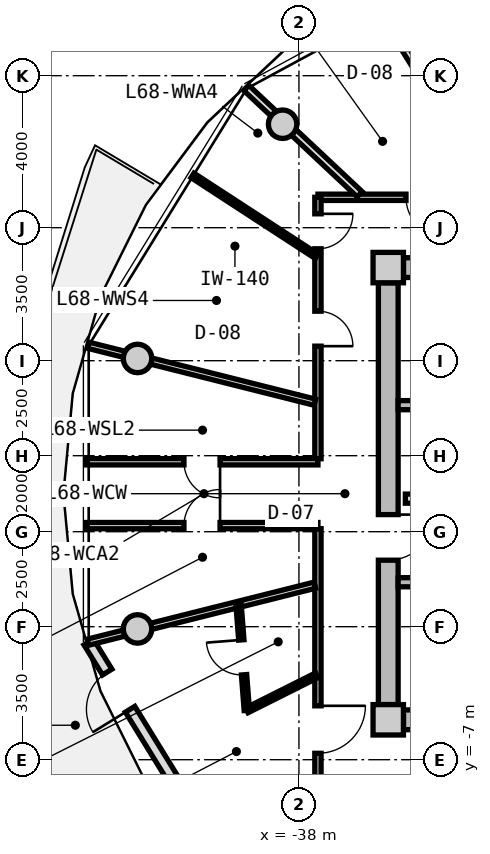
"""IFC4 building model, lengths in metres.
Left out: names, types, materials, properties, quantities, classifications, styles, units other than length and angle.
Written with IfcOpenShell. Run it as: python <this file> out.ifc"""

import sys

from ifc_helpers import new_model, si_unit, direction, frame, frame_2d, origin, origin_2d, place, context, subcontext, project, spatial, rectangle, circle, extrude, source, transform, mapped, element, fill, save


model = new_model("IFC4")
c1 = context("Model", 3, precision=1e-05, world=origin(), true_north=direction((0.0, 1.0)))
c2 = subcontext(c1, "Body", "Model", "MODEL_VIEW")
j1 = project(units=[si_unit("LENGTHUNIT", "METRE"), si_unit("PLANEANGLEUNIT", "RADIAN")], contexts=[c1])
p1 = place(None, origin())
s1 = spatial("IfcSite", under=j1, at=p1, CompositionType="ELEMENT")
p2 = place(p1, origin())
s2 = spatial("IfcBuilding", under=s1, at=p2, CompositionType="ELEMENT")
p3 = place(p2, frame((0.0, 0.0, 220.0)))
s3 = spatial("IfcBuildingStorey", under=s2, at=p3, CompositionType="ELEMENT", Elevation=220.0)
m1 = source(origin(), c2, "Body", "SweptSolid", [
    extrude(rectangle(XDim=0.8, YDim=0.8, at=origin_2d()), origin(), (0.0, 0.0, 1.0), 3.05),
])
for number, where, z_axis, x_axis in (
    (1, (-35.65, -5.95, 0.0), (0.0, 0.0, 1.0), (1.0, 0.0, 0.0)),
    (2, (-35.65, 5.95, 0.0), (0.0, 0.0, 1.0), (1.0, 0.0, 0.0)),
):
    element("IfcColumn", number, at=place(p3, frame(where, z_axis=z_axis, x_axis=x_axis)), inside=s3, PredefinedType="COLUMN", context=c2, shape_type="MappedRepresentation", body=[
        mapped(m1, transform((0.0, 0.0, 0.0), x_axis=(1.0, 0.0, 0.0), y_axis=(0.0, 1.0, 0.0), z_axis=(0.0, 0.0, 1.0), scale=1.0)),
    ])
m2 = source(origin(), c2, "Body", "SweptSolid", [
    extrude(rectangle(XDim=14.5, YDim=0.52, at=frame_2d((7.25, 0.0))), origin(), (0.0, 0.0, 1.0), 2.76),
])
for number, where, z_axis, x_axis in (
    (3, (-35.25, 5.95, 0.0), (0.0, 0.0, 1.0), (1.0, 0.0, 0.0)),
    (4, (-20.75, -5.95, 0.0), (0.0, 0.0, 1.0), (-1.0, 0.0, 0.0)),
):
    element("IfcWall", number, at=place(p3, frame(where, z_axis=z_axis, x_axis=x_axis)), inside=s3, PredefinedType="SHEAR", context=c2, shape_type="MappedRepresentation", body=[
        mapped(m2, transform((0.0, 0.0, 0.0), x_axis=(1.0, 0.0, 0.0), y_axis=(0.0, 1.0, 0.0), z_axis=(0.0, 0.0, 1.0), scale=1.0)),
    ])
m3 = source(origin(), c2, "Body", "SweptSolid", [
    extrude(rectangle(XDim=11.1, YDim=0.52, at=frame_2d((5.55, 0.0))), origin(), (0.0, 0.0, 1.0), 2.76),
])
p4 = place(p3, frame((-35.65, -5.55, 0.0), z_axis=(0.0, 0.0, 1.0), x_axis=(0.0, 1.0, 0.0)))
e5 = element("IfcWall", 5, at=p4, inside=s3, PredefinedType="SHEAR", context=c2, shape_type="MappedRepresentation", body=[
    mapped(m3, transform((0.0, 0.0, 0.0), x_axis=(1.0, 0.0, 0.0), y_axis=(0.0, 1.0, 0.0), z_axis=(0.0, 0.0, 1.0), scale=1.0)),
])
p5 = place(p4, frame((3.8, 0.0, 0.0)))
e6 = element("IfcOpeningElement", 6, at=p5, cuts=e5, PredefinedType="OPENING", context=c2, shape_type="SweptSolid", body=[
    extrude(rectangle(XDim=1.2, YDim=2.15, at=frame_2d((0.6, 1.075))), frame((0.0, 0.27, 0.0), z_axis=(0.0, -1.0, 0.0), x_axis=(1.0, 0.0, 0.0)), (0.0, 0.0, 1.0), 0.54),
])
m4 = source(origin(), c2, "Body", "SweptSolid", [
    extrude(circle(Radius=0.375, at=origin_2d()), origin(), (0.0, 0.0, 1.0), 3.05),
])
for number, where, z_axis, x_axis in (
    (7, (-38.43, 9.723, 0.0), (0.0, 0.0, 1.0), (1.0, 0.0, 0.0)),
    (8, (-42.247, 3.559, 0.0), (0.0, 0.0, 1.0), (1.0, 0.0, 0.0)),
    (9, (-42.247, -3.559, 0.0), (0.0, 0.0, 1.0), (1.0, 0.0, 0.0)),
):
    element("IfcColumn", number, at=place(p3, frame(where, z_axis=z_axis, x_axis=x_axis)), inside=s3, PredefinedType="COLUMN", context=c2, shape_type="MappedRepresentation", body=[
        mapped(m4, transform((0.0, 0.0, 0.0), x_axis=(1.0, 0.0, 0.0), y_axis=(0.0, 1.0, 0.0), z_axis=(0.0, 0.0, 1.0), scale=1.0)),
    ])
m5 = source(origin(), c2, "Body", "SweptSolid", [
    extrude(rectangle(XDim=7.938, YDim=0.29, at=frame_2d((3.969, 0.0))), origin(), (0.0, 0.0, 1.0), 2.76),
])
p6 = place(p3, frame((-39.37, -10.663, 0.0), z_axis=(0.0, 0.0, 1.0), x_axis=(-0.524244987663, 0.851567491694, 0.0)))
e10 = element("IfcWall", 10, at=p6, inside=s3, PredefinedType="SOLIDWALL", context=c2, shape_type="MappedRepresentation", body=[
    mapped(m5, transform((0.0, 0.0, 0.0), x_axis=(1.0, 0.0, 0.0), y_axis=(0.0, 1.0, 0.0), z_axis=(0.0, 0.0, 1.0), scale=1.0)),
])
p7 = place(p6, frame((5.86, 0.0, 0.0)))
e11 = element("IfcOpeningElement", 11, at=p7, cuts=e10, PredefinedType="OPENING", context=c2, shape_type="SweptSolid", body=[
    extrude(rectangle(XDim=1.15, YDim=2.25, at=frame_2d((0.575, 1.125))), frame((0.0, 0.155, 0.0), z_axis=(0.0, -1.0, 0.0), x_axis=(1.0, 0.0, 0.0)), (0.0, 0.0, 1.0), 0.31),
])
p8 = place(p6, frame((0.85, 0.0, 0.85)))
e12 = element("IfcOpeningElement", 12, at=p8, cuts=e10, PredefinedType="OPENING", context=c2, shape_type="SweptSolid", body=[
    extrude(rectangle(XDim=1.2, YDim=1.5, at=frame_2d((0.6, 0.75))), frame((0.0, 0.155, 0.0), z_axis=(0.0, -1.0, 0.0), x_axis=(1.0, 0.0, 0.0)), (0.0, 0.0, 1.0), 0.31),
])
m6 = source(origin(), c2, "Body", "SweptSolid", [
    extrude(rectangle(XDim=7.93, YDim=0.24, at=frame_2d((3.965, 0.0))), origin(), (0.0, 0.0, 1.0), 2.76),
])
p9 = place(p3, frame((-35.39, 2.33, 0.0), z_axis=(0.0, 0.0, 1.0), x_axis=(1.0, 0.0, 0.0)))
e13 = element("IfcWall", 13, at=p9, inside=s3, PredefinedType="PARTITIONING", context=c2, shape_type="MappedRepresentation", body=[
    mapped(m6, transform((0.0, 0.0, 0.0), x_axis=(1.0, 0.0, 0.0), y_axis=(0.0, 1.0, 0.0), z_axis=(0.0, 0.0, 1.0), scale=1.0)),
])
p10 = place(p3, frame((-35.39, -2.33, 0.0), z_axis=(0.0, 0.0, 1.0), x_axis=(1.0, 0.0, 0.0)))
e14 = element("IfcWall", 14, at=p10, inside=s3, PredefinedType="PARTITIONING", context=c2, shape_type="MappedRepresentation", body=[
    mapped(m6, transform((0.0, 0.0, 0.0), x_axis=(1.0, 0.0, 0.0), y_axis=(0.0, 1.0, 0.0), z_axis=(0.0, 0.0, 1.0), scale=1.0)),
])
p11 = place(p10, frame((1.05, 0.0, 0.0)))
e15 = element("IfcOpeningElement", 15, at=p11, cuts=e14, PredefinedType="OPENING", context=c2, shape_type="SweptSolid", body=[
    extrude(rectangle(XDim=1.1, YDim=2.15, at=frame_2d((0.55, 1.075))), frame((0.0, 0.13, 0.0), z_axis=(0.0, -1.0, 0.0), x_axis=(1.0, 0.0, 0.0)), (0.0, 0.0, 1.0), 0.26),
])
m7 = source(origin(), c2, "Body", "SweptSolid", [
    extrude(rectangle(XDim=7.62, YDim=0.24, at=frame_2d((3.81, 0.0))), origin(), (0.0, 0.0, 1.0), 2.745),
])
p12 = place(p3, frame((-35.2, -0.13, 0.0), z_axis=(0.0, 0.0, 1.0), x_axis=(1.0, 0.0, 0.0)))
e16 = element("IfcWall", 16, at=p12, inside=s3, PredefinedType="PARTITIONING", context=c2, shape_type="MappedRepresentation", body=[
    mapped(m7, transform((0.0, 0.0, 0.0), x_axis=(1.0, 0.0, 0.0), y_axis=(0.0, 1.0, 0.0), z_axis=(0.0, 0.0, 1.0), scale=1.0)),
])
p13 = place(p12, frame((6.22, 0.0, 0.0)))
e17 = element("IfcOpeningElement", 17, at=p13, cuts=e16, PredefinedType="OPENING", context=c2, shape_type="SweptSolid", body=[
    extrude(rectangle(XDim=1.0, YDim=2.1, at=frame_2d((0.5, 1.05))), frame((0.0, 0.13, 0.0), z_axis=(0.0, -1.0, 0.0), x_axis=(1.0, 0.0, 0.0)), (0.0, 0.0, 1.0), 0.26),
])
p14 = place(p12, frame((2.4, 0.0, 0.0)))
e18 = element("IfcOpeningElement", 18, at=p14, cuts=e16, PredefinedType="OPENING", context=c2, shape_type="SweptSolid", body=[
    extrude(rectangle(XDim=1.0, YDim=2.1, at=frame_2d((0.5, 1.05))), frame((0.0, 0.13, 0.0), z_axis=(0.0, -1.0, 0.0), x_axis=(1.0, 0.0, 0.0)), (0.0, 0.0, 1.0), 0.26),
])
m8 = source(origin(), c2, "Body", "SweptSolid", [
    extrude(rectangle(XDim=8.58, YDim=0.165, at=frame_2d((4.29, 0.0))), origin(), (0.0, 0.0, 1.0), 2.745),
])
p15 = place(p3, frame((-37.5, 7.8, 0.0), z_axis=(0.0, 0.0, 1.0), x_axis=(1.0, 0.0, 0.0)))
e19 = element("IfcWall", 19, at=p15, inside=s3, PredefinedType="PARTITIONING", context=c2, shape_type="MappedRepresentation", body=[
    mapped(m8, transform((0.0, 0.0, 0.0), x_axis=(1.0, 0.0, 0.0), y_axis=(0.0, 1.0, 0.0), z_axis=(0.0, 0.0, 1.0), scale=1.0)),
])
p16 = place(p15, frame((5.408, 0.0, 0.0)))
e20 = element("IfcOpeningElement", 20, at=p16, cuts=e19, PredefinedType="OPENING", context=c2, shape_type="SweptSolid", body=[
    extrude(rectangle(XDim=1.05, YDim=2.15, at=frame_2d((0.525, 1.075))), frame((0.0, 0.093, 0.0), z_axis=(0.0, -1.0, 0.0), x_axis=(1.0, 0.0, 0.0)), (0.0, 0.0, 1.0), 0.185),
])
p17 = place(p15, frame((2.317, 0.0, 0.0)))
e21 = element("IfcOpeningElement", 21, at=p17, cuts=e19, PredefinedType="OPENING", context=c2, shape_type="SweptSolid", body=[
    extrude(rectangle(XDim=1.05, YDim=2.15, at=frame_2d((0.525, 1.075))), frame((0.0, 0.093, 0.0), z_axis=(0.0, -1.0, 0.0), x_axis=(1.0, 0.0, 0.0)), (0.0, 0.0, 1.0), 0.185),
])
m9 = source(origin(), c2, "Body", "SweptSolid", [
    extrude(rectangle(XDim=6.88, YDim=0.165, at=frame_2d((3.44, 0.0))), origin(), (0.0, 0.0, 1.0), 2.745),
])
p18 = place(p3, frame((-37.5, -7.8, 0.0), z_axis=(0.0, 0.0, 1.0), x_axis=(0.0, 1.0, 0.0)))
e22 = element("IfcWall", 22, at=p18, inside=s3, PredefinedType="PARTITIONING", context=c2, shape_type="MappedRepresentation", body=[
    mapped(m9, transform((0.0, 0.0, 0.0), x_axis=(1.0, 0.0, 0.0), y_axis=(0.0, 1.0, 0.0), z_axis=(0.0, 0.0, 1.0), scale=1.0)),
])
p19 = place(p18, frame((0.968, 0.0, 0.0)))
e23 = element("IfcOpeningElement", 23, at=p19, cuts=e22, PredefinedType="OPENING", context=c2, shape_type="SweptSolid", body=[
    extrude(rectangle(XDim=1.25, YDim=2.2, at=frame_2d((0.625, 1.1))), frame((0.0, 0.093, 0.0), z_axis=(0.0, -1.0, 0.0), x_axis=(1.0, 0.0, 0.0)), (0.0, 0.0, 1.0), 0.185),
])
p20 = place(p3, frame((-37.5, 0.92, 0.0), z_axis=(0.0, 0.0, 1.0), x_axis=(0.0, 1.0, 0.0)))
e24 = element("IfcWall", 24, at=p20, inside=s3, PredefinedType="PARTITIONING", context=c2, shape_type="MappedRepresentation", body=[
    mapped(m9, transform((0.0, 0.0, 0.0), x_axis=(1.0, 0.0, 0.0), y_axis=(0.0, 1.0, 0.0), z_axis=(0.0, 0.0, 1.0), scale=1.0)),
])
p21 = place(p20, frame((5.525, 0.0, 0.0)))
e25 = element("IfcOpeningElement", 25, at=p21, cuts=e24, PredefinedType="OPENING", context=c2, shape_type="SweptSolid", body=[
    extrude(rectangle(XDim=0.92, YDim=2.1, at=frame_2d((0.46, 1.05))), frame((0.0, 0.093, 0.0), z_axis=(0.0, -1.0, 0.0), x_axis=(1.0, 0.0, 0.0)), (0.0, 0.0, 1.0), 0.185),
])
p22 = place(p20, frame((2.962, 0.0, 0.0)))
e26 = element("IfcOpeningElement", 26, at=p22, cuts=e24, PredefinedType="OPENING", context=c2, shape_type="SweptSolid", body=[
    extrude(rectangle(XDim=0.92, YDim=2.1, at=frame_2d((0.46, 1.05))), frame((0.0, 0.093, 0.0), z_axis=(0.0, -1.0, 0.0), x_axis=(1.0, 0.0, 0.0)), (0.0, 0.0, 1.0), 0.185),
])
m10 = source(origin(), c2, "Body", "SweptSolid", [
    extrude(rectangle(XDim=6.157, YDim=0.165, at=frame_2d((3.079, 0.0))), origin(), (0.0, 0.0, 1.0), 2.345),
])
for number, where, z_axis, x_axis in (
    (27, (-37.58, 2.407, 0.0), (0.0, 0.0, 1.0), (-0.97, 0.244, 0.0)),
    (28, (-37.58, -2.407, 0.0), (0.0, 0.0, 1.0), (-0.97, -0.244, 0.0)),
):
    element("IfcWall", number, at=place(p3, frame(where, z_axis=z_axis, x_axis=x_axis)), inside=s3, PredefinedType="PARTITIONING", context=c2, shape_type="MappedRepresentation", body=[
        mapped(m10, transform((0.0, 0.0, 0.0), x_axis=(1.0, 0.0, 0.0), y_axis=(0.0, 1.0, 0.0), z_axis=(0.0, 0.0, 1.0), scale=1.0)),
    ])
m11 = source(origin(), c2, "Body", "SweptSolid", [
    extrude(rectangle(XDim=6.101, YDim=0.165, at=frame_2d((3.051, 0.0))), origin(), (0.0, 0.0, 1.0), 2.745),
])
p23 = place(p3, frame((-43.601, 0.84, 0.0), z_axis=(0.0, 0.0, 1.0), x_axis=(1.0, 0.0, 0.0)))
e29 = element("IfcWall", 29, at=p23, inside=s3, PredefinedType="PARTITIONING", context=c2, shape_type="MappedRepresentation", body=[
    mapped(m11, transform((0.0, 0.0, 0.0), x_axis=(1.0, 0.0, 0.0), y_axis=(0.0, 1.0, 0.0), z_axis=(0.0, 0.0, 1.0), scale=1.0)),
])
p24 = place(p23, frame((2.576, 0.0, 0.0)))
e30 = element("IfcOpeningElement", 30, at=p24, cuts=e29, PredefinedType="OPENING", context=c2, shape_type="SweptSolid", body=[
    extrude(rectangle(XDim=0.95, YDim=2.1, at=frame_2d((0.475, 1.05))), frame((0.0, 0.093, 0.0), z_axis=(0.0, -1.0, 0.0), x_axis=(1.0, 0.0, 0.0)), (0.0, 0.0, 1.0), 0.185),
])
p25 = place(p3, frame((-37.5, -0.84, 0.0), z_axis=(0.0, 0.0, 1.0), x_axis=(-1.0, 0.0, 0.0)))
e31 = element("IfcWall", 31, at=p25, inside=s3, PredefinedType="PARTITIONING", context=c2, shape_type="MappedRepresentation", body=[
    mapped(m11, transform((0.0, 0.0, 0.0), x_axis=(1.0, 0.0, 0.0), y_axis=(0.0, 1.0, 0.0), z_axis=(0.0, 0.0, 1.0), scale=1.0)),
])
p26 = place(p25, frame((2.576, 0.0, 0.0)))
e32 = element("IfcOpeningElement", 32, at=p26, cuts=e31, PredefinedType="OPENING", context=c2, shape_type="SweptSolid", body=[
    extrude(rectangle(XDim=0.95, YDim=2.1, at=frame_2d((0.475, 1.05))), frame((0.0, 0.093, 0.0), z_axis=(0.0, -1.0, 0.0), x_axis=(1.0, 0.0, 0.0)), (0.0, 0.0, 1.0), 0.185),
])
m12 = source(origin(), c2, "Body", "SweptSolid", [
    extrude(rectangle(XDim=4.089, YDim=0.19, at=frame_2d((2.044, 0.0))), origin(), (0.0, 0.0, 1.0), 2.345),
])
p27 = place(p3, frame((-36.402, 7.88, 0.0), z_axis=(0.0, 0.0, 1.0), x_axis=(-0.729401273609, 0.684086092577, 0.0)))
e33 = element("IfcWall", 33, at=p27, inside=s3, PredefinedType="PARTITIONING", context=c2, shape_type="MappedRepresentation", body=[
    mapped(m12, transform((0.0, 0.0, 0.0), x_axis=(1.0, 0.0, 0.0), y_axis=(0.0, 1.0, 0.0), z_axis=(0.0, 0.0, 1.0), scale=1.0)),
])
m13 = source(origin(), c2, "Body", "SweptSolid", [
    extrude(rectangle(XDim=5.652, YDim=0.19, at=frame_2d((2.826, 0.0))), origin(), (0.0, 0.0, 1.0), 2.745),
])
p28 = place(p3, frame((-32.794, 7.83, 0.0), z_axis=(0.0, 0.0, 1.0), x_axis=(-0.527566076956, 0.84951399897, 0.0)))
e34 = element("IfcWall", 34, at=p28, inside=s3, PredefinedType="PARTITIONING", context=c2, shape_type="MappedRepresentation", body=[
    mapped(m13, transform((0.0, 0.0, 0.0), x_axis=(1.0, 0.0, 0.0), y_axis=(0.0, 1.0, 0.0), z_axis=(0.0, 0.0, 1.0), scale=1.0)),
])
m14 = source(origin(), c2, "Body", "SweptSolid", [
    extrude(rectangle(XDim=3.904, YDim=0.14, at=frame_2d((1.952, 0.0))), origin(), (0.0, 0.0, 1.0), 2.745),
])
p29 = place(p3, frame((-37.53, 6.246, 0.0), z_axis=(0.0, 0.0, 1.0), x_axis=(-0.838024687996, 0.545632314209, 0.0)))
e35 = element("IfcWall", 35, at=p29, inside=s3, PredefinedType="PARTITIONING", context=c2, shape_type="MappedRepresentation", body=[
    mapped(m14, transform((0.0, 0.0, 0.0), x_axis=(1.0, 0.0, 0.0), y_axis=(0.0, 1.0, 0.0), z_axis=(0.0, 0.0, 1.0), scale=1.0)),
])
m15 = source(origin(), c2, "Body", "SweptSolid", [
    extrude(rectangle(XDim=2.06, YDim=0.14, at=frame_2d((1.03, 0.0))), origin(), (0.0, 0.0, 1.0), 2.745),
])
p30 = place(p3, frame((-37.53, -4.778, 0.0), z_axis=(0.0, 0.0, 1.0), x_axis=(-0.893952568722, -0.448161583444, 0.0)))
e36 = element("IfcWall", 36, at=p30, inside=s3, PredefinedType="PARTITIONING", context=c2, shape_type="MappedRepresentation", body=[
    mapped(m15, transform((0.0, 0.0, 0.0), x_axis=(1.0, 0.0, 0.0), y_axis=(0.0, 1.0, 0.0), z_axis=(0.0, 0.0, 1.0), scale=1.0)),
])
m16 = source(origin(), c2, "Body", "SweptSolid", [
    extrude(rectangle(XDim=2.798, YDim=0.14, at=frame_2d((1.399, 0.0))), origin(), (0.0, 0.0, 1.0), 2.745),
])
p31 = place(p3, frame((-39.371, -5.701, 0.0), z_axis=(0.0, 0.0, 1.0), x_axis=(-0.077823984089, 0.996967114553, 0.0)))
e37 = element("IfcWall", 37, at=p31, inside=s3, PredefinedType="PARTITIONING", context=c2, shape_type="MappedRepresentation", body=[
    mapped(m16, transform((0.0, 0.0, 0.0), x_axis=(1.0, 0.0, 0.0), y_axis=(0.0, 1.0, 0.0), z_axis=(0.0, 0.0, 1.0), scale=1.0)),
])
p32 = place(p31, frame((0.939, 0.0, 0.0)))
e38 = element("IfcOpeningElement", 38, at=p32, cuts=e37, PredefinedType="OPENING", context=c2, shape_type="SweptSolid", body=[
    extrude(rectangle(XDim=0.92, YDim=2.1, at=frame_2d((0.46, 1.05))), frame((0.0, 0.08, 0.0), z_axis=(0.0, -1.0, 0.0), x_axis=(1.0, 0.0, 0.0)), (0.0, 0.0, 1.0), 0.16),
])
m17 = source(origin(), c2, "Body", "SweptSolid", [
    extrude(rectangle(XDim=1.15, YDim=2.25, at=frame_2d((0.575, 1.125))), frame((0.0, 0.025, 0.0), z_axis=(0.0, -1.0, 0.0), x_axis=(1.0, 0.0, 0.0)), (0.0, 0.0, 1.0), 0.05),
])
p33 = place(p7, origin())
e39 = element("IfcDoor", 39, at=p33, inside=s3, OperationType="SINGLE_SWING_LEFT", PredefinedType="DOOR", context=c2, shape_type="MappedRepresentation", body=[
    mapped(m17, transform((0.0, 0.0, 0.0), x_axis=(1.0, 0.0, 0.0), y_axis=(0.0, 1.0, 0.0), z_axis=(0.0, 0.0, 1.0), scale=1.0)),
])
fill(e11, e39)
m18 = source(origin(), c2, "Body", "SweptSolid", [
    extrude(rectangle(XDim=1.2, YDim=2.15, at=frame_2d((0.6, 1.075))), frame((0.0, 0.025, 0.0), z_axis=(0.0, -1.0, 0.0), x_axis=(1.0, 0.0, 0.0)), (0.0, 0.0, 1.0), 0.05),
])
p34 = place(p5, frame((1.2, 0.0, 0.0), z_axis=(0.0, 0.0, 1.0), x_axis=(-1.0, 0.0, 0.0)))
e40 = element("IfcDoor", 40, at=p34, inside=s3, OperationType="SINGLE_SWING_LEFT", PredefinedType="DOOR", context=c2, shape_type="MappedRepresentation", body=[
    mapped(m18, transform((0.0, 0.0, 0.0), x_axis=(1.0, 0.0, 0.0), y_axis=(0.0, 1.0, 0.0), z_axis=(0.0, 0.0, 1.0), scale=1.0)),
])
fill(e6, e40)
m19 = source(origin(), c2, "Body", "SweptSolid", [
    extrude(rectangle(XDim=0.95, YDim=2.1, at=frame_2d((0.475, 1.05))), frame((0.0, 0.025, 0.0), z_axis=(0.0, -1.0, 0.0), x_axis=(1.0, 0.0, 0.0)), (0.0, 0.0, 1.0), 0.05),
])
p35 = place(p26, frame((0.95, 0.0, 0.0), z_axis=(0.0, 0.0, 1.0), x_axis=(-1.0, 0.0, 0.0)))
e41 = element("IfcDoor", 41, at=p35, inside=s3, OperationType="SINGLE_SWING_RIGHT", PredefinedType="DOOR", context=c2, shape_type="MappedRepresentation", body=[
    mapped(m19, transform((0.0, 0.0, 0.0), x_axis=(1.0, 0.0, 0.0), y_axis=(0.0, 1.0, 0.0), z_axis=(0.0, 0.0, 1.0), scale=1.0)),
])
fill(e32, e41)
p36 = place(p24, frame((0.95, 0.0, 0.0), z_axis=(0.0, 0.0, 1.0), x_axis=(-1.0, 0.0, 0.0)))
e42 = element("IfcDoor", 42, at=p36, inside=s3, OperationType="SINGLE_SWING_LEFT", PredefinedType="DOOR", context=c2, shape_type="MappedRepresentation", body=[
    mapped(m19, transform((0.0, 0.0, 0.0), x_axis=(1.0, 0.0, 0.0), y_axis=(0.0, 1.0, 0.0), z_axis=(0.0, 0.0, 1.0), scale=1.0)),
])
fill(e30, e42)
m20 = source(origin(), c2, "Body", "SweptSolid", [
    extrude(rectangle(XDim=1.05, YDim=2.15, at=frame_2d((0.525, 1.075))), frame((0.0, 0.025, 0.0), z_axis=(0.0, -1.0, 0.0), x_axis=(1.0, 0.0, 0.0)), (0.0, 0.0, 1.0), 0.05),
])
p37 = place(p17, frame((1.05, 0.0, 0.0), z_axis=(0.0, 0.0, 1.0), x_axis=(-1.0, 0.0, 0.0)))
e43 = element("IfcDoor", 43, at=p37, inside=s3, OperationType="SINGLE_SWING_LEFT", PredefinedType="DOOR", context=c2, shape_type="MappedRepresentation", body=[
    mapped(m20, transform((0.0, 0.0, 0.0), x_axis=(1.0, 0.0, 0.0), y_axis=(0.0, 1.0, 0.0), z_axis=(0.0, 0.0, 1.0), scale=1.0)),
])
fill(e21, e43)
m21 = source(origin(), c2, "Body", "SweptSolid", [
    extrude(rectangle(XDim=0.92, YDim=2.1, at=frame_2d((0.46, 1.05))), frame((0.0, 0.025, 0.0), z_axis=(0.0, -1.0, 0.0), x_axis=(1.0, 0.0, 0.0)), (0.0, 0.0, 1.0), 0.05),
])
p38 = place(p21, frame((0.92, 0.0, 0.0), z_axis=(0.0, 0.0, 1.0), x_axis=(-1.0, 0.0, 0.0)))
e44 = element("IfcDoor", 44, at=p38, inside=s3, OperationType="SINGLE_SWING_LEFT", PredefinedType="DOOR", context=c2, shape_type="MappedRepresentation", body=[
    mapped(m21, transform((0.0, 0.0, 0.0), x_axis=(1.0, 0.0, 0.0), y_axis=(0.0, 1.0, 0.0), z_axis=(0.0, 0.0, 1.0), scale=1.0)),
])
fill(e25, e44)
p39 = place(p22, frame((0.92, 0.0, 0.0), z_axis=(0.0, 0.0, 1.0), x_axis=(-1.0, 0.0, 0.0)))
e45 = element("IfcDoor", 45, at=p39, inside=s3, OperationType="SINGLE_SWING_RIGHT", PredefinedType="DOOR", context=c2, shape_type="MappedRepresentation", body=[
    mapped(m21, transform((0.0, 0.0, 0.0), x_axis=(1.0, 0.0, 0.0), y_axis=(0.0, 1.0, 0.0), z_axis=(0.0, 0.0, 1.0), scale=1.0)),
])
fill(e26, e45)
m22 = source(origin(), c2, "Body", "SweptSolid", [
    extrude(rectangle(XDim=1.25, YDim=2.2, at=frame_2d((0.625, 1.1))), frame((0.0, 0.025, 0.0), z_axis=(0.0, -1.0, 0.0), x_axis=(1.0, 0.0, 0.0)), (0.0, 0.0, 1.0), 0.05),
])
p40 = place(p19, frame((1.25, 0.0, 0.0), z_axis=(0.0, 0.0, 1.0), x_axis=(-1.0, 0.0, 0.0)))
e46 = element("IfcDoor", 46, at=p40, inside=s3, OperationType="SINGLE_SWING_LEFT", PredefinedType="DOOR", context=c2, shape_type="MappedRepresentation", body=[
    mapped(m22, transform((0.0, 0.0, 0.0), x_axis=(1.0, 0.0, 0.0), y_axis=(0.0, 1.0, 0.0), z_axis=(0.0, 0.0, 1.0), scale=1.0)),
])
fill(e23, e46)
p41 = place(p32, origin())
e47 = element("IfcDoor", 47, at=p41, inside=s3, OperationType="SINGLE_SWING_RIGHT", PredefinedType="DOOR", context=c2, shape_type="MappedRepresentation", body=[
    mapped(m21, transform((0.0, 0.0, 0.0), x_axis=(1.0, 0.0, 0.0), y_axis=(0.0, 1.0, 0.0), z_axis=(0.0, 0.0, 1.0), scale=1.0)),
])
fill(e38, e47)
save(model, sys.argv[1])
